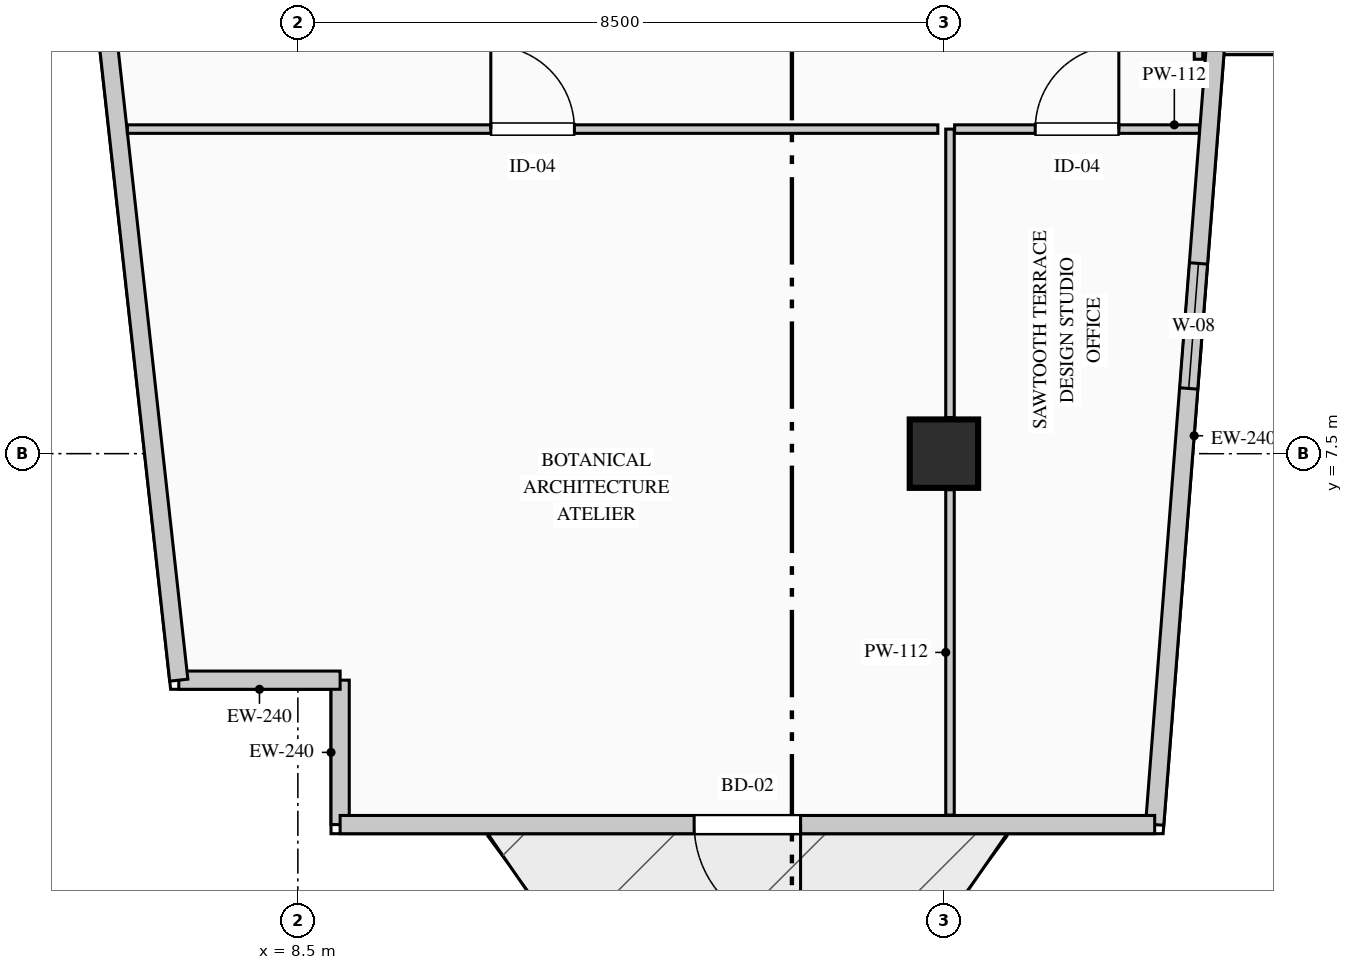
"""IFC4 building model, lengths in metres.
Left out: names, types, materials, properties, quantities, classifications, styles, units other than length and angle.
Written with IfcOpenShell. Run it as: python <this file> out.ifc"""

import sys

from ifc_helpers import new_model, si_unit, direction, frame, frame_2d, origin, origin_2d, place, context, subcontext, project, spatial, rectangle, extrude, element, fill, save


model = new_model("IFC4")
c1 = context("Model", 3, precision=1e-05, world=origin(), true_north=direction((0.0, 1.0)))
c2 = subcontext(c1, "Body", "Model", "MODEL_VIEW")
j1 = project(units=[si_unit("LENGTHUNIT", "METRE"), si_unit("PLANEANGLEUNIT", "RADIAN")], contexts=[c1])
p1 = place(None, origin())
s1 = spatial("IfcSite", under=j1, at=p1, CompositionType="ELEMENT")
p2 = place(p1, origin())
s2 = spatial("IfcBuilding", under=s1, at=p2, CompositionType="ELEMENT")
p3 = place(p2, frame((0.0, 0.0, 235.1)))
s3 = spatial("IfcBuildingStorey", under=s2, at=p3, CompositionType="ELEMENT", Elevation=235.1)
p4 = place(p3, frame((17.0, 7.5, 0.0), z_axis=(0.0, 0.0, 1.0), x_axis=(1.0, 0.0, 0.0)))
e1 = element("IfcColumn", 1, at=p4, inside=s3, PredefinedType="COLUMN", context=c2, shape_type="SweptSolid", body=[
    extrude(rectangle(XDim=0.9, YDim=0.9, at=origin_2d()), origin(), (0.0, 0.0, 1.0), 3.95),
])
p5 = place(p3, frame((9.056, 2.62, 0.0), z_axis=(0.0, 0.0, 1.0), x_axis=(0.0, 1.0, 0.0)))
e2 = element("IfcWall", 2, at=p5, inside=s3, PredefinedType="STANDARD", context=c2, shape_type="SweptSolid", body=[
    extrude(rectangle(XDim=1.9, YDim=0.24, at=frame_2d((0.95, 0.0))), origin(), (0.0, 0.0, 1.0), 3.7),
])
p6 = place(p3, frame((9.056, 4.52, 0.0), z_axis=(0.0, 0.0, 1.0), x_axis=(-1.0, 0.0, 0.0)))
e3 = element("IfcWall", 3, at=p6, inside=s3, PredefinedType="STANDARD", context=c2, shape_type="SweptSolid", body=[
    extrude(rectangle(XDim=2.123, YDim=0.24, at=frame_2d((1.061, 0.0))), origin(), (0.0, 0.0, 1.0), 3.7),
])
p7 = place(p3, frame((6.933, 4.52, 0.0), z_axis=(0.0, 0.0, 1.0), x_axis=(-0.109965284523, 0.993935428587, 0.0)))
e4 = element("IfcWall", 4, at=p7, inside=s3, PredefinedType="STANDARD", context=c2, shape_type="SweptSolid", body=[
    extrude(rectangle(XDim=37.186, YDim=0.24, at=frame_2d((18.593, 0.0))), origin(), (0.0, 0.0, 1.0), 3.7),
])
p8 = place(p7, frame((12.562, 0.0, 0.9)))
e5 = element("IfcOpeningElement", 5, at=p8, cuts=e4, PredefinedType="OPENING", context=c2, shape_type="SweptSolid", body=[
    extrude(rectangle(XDim=1.65, YDim=1.95, at=frame_2d((0.825, 0.975))), frame((0.0, 0.13, 0.0), z_axis=(0.0, -1.0, 0.0), x_axis=(1.0, 0.0, 0.0)), (0.0, 0.0, 1.0), 0.26),
])
p9 = place(p3, frame((26.495, 12.87, 0.0), z_axis=(0.0, 0.0, 1.0), x_axis=(-1.0, 0.0, 0.0)))
e6 = element("IfcWall", 6, at=p9, inside=s3, PredefinedType="STANDARD", context=c2, shape_type="SweptSolid", body=[
    extrude(rectangle(XDim=5.922, YDim=0.24, at=frame_2d((2.961, 0.0))), origin(), (0.0, 0.0, 1.0), 3.7),
])
p10 = place(p3, frame((20.573, 12.87, 0.0), z_axis=(0.0, 0.0, 1.0), x_axis=(-0.077816860153, -0.996967670627, 0.0)))
e7 = element("IfcWall", 7, at=p10, inside=s3, PredefinedType="STANDARD", context=c2, shape_type="SweptSolid", body=[
    extrude(rectangle(XDim=10.281, YDim=0.24, at=frame_2d((5.141, 0.0))), origin(), (0.0, 0.0, 1.0), 3.7),
])
p11 = place(p10, frame((2.876, 0.0, 0.9)))
e8 = element("IfcOpeningElement", 8, at=p11, cuts=e7, PredefinedType="OPENING", context=c2, shape_type="SweptSolid", body=[
    extrude(rectangle(XDim=1.65, YDim=1.95, at=frame_2d((0.825, 0.975))), frame((0.0, 0.13, 0.0), z_axis=(0.0, -1.0, 0.0), x_axis=(1.0, 0.0, 0.0)), (0.0, 0.0, 1.0), 0.26),
])
p12 = place(p3, frame((19.773, 2.62, 0.0), z_axis=(0.0, 0.0, 1.0), x_axis=(-1.0, 0.0, 0.0)))
e9 = element("IfcWall", 9, at=p12, inside=s3, PredefinedType="STANDARD", context=c2, shape_type="SweptSolid", body=[
    extrude(rectangle(XDim=10.717, YDim=0.24, at=frame_2d((5.358, 0.0))), origin(), (0.0, 0.0, 1.0), 3.7),
])
p13 = place(p12, frame((4.659, 0.0, 0.0)))
e10 = element("IfcOpeningElement", 10, at=p13, cuts=e9, PredefinedType="OPENING", context=c2, shape_type="SweptSolid", body=[
    extrude(rectangle(XDim=1.4, YDim=2.2, at=frame_2d((0.7, 1.1))), frame((0.0, 0.13, 0.0), z_axis=(0.0, -1.0, 0.0), x_axis=(1.0, 0.0, 0.0)), (0.0, 0.0, 1.0), 0.26),
])
p14 = place(p3, frame((17.08, 2.745, 0.0), z_axis=(0.0, 0.0, 1.0), x_axis=(0.0, 1.0, 0.0)))
e11 = element("IfcWall", 11, at=p14, inside=s3, PredefinedType="PARTITIONING", context=c2, shape_type="SweptSolid", body=[
    extrude(rectangle(XDim=4.28, YDim=0.112, at=frame_2d((2.14, 0.0))), origin(), (0.0, 0.0, 1.0), 3.7),
])
p15 = place(p3, frame((17.08, 7.975, 0.0), z_axis=(0.0, 0.0, 1.0), x_axis=(0.0, 1.0, 0.0)))
e12 = element("IfcWall", 12, at=p15, inside=s3, PredefinedType="PARTITIONING", context=c2, shape_type="SweptSolid", body=[
    extrude(rectangle(XDim=3.795, YDim=0.112, at=frame_2d((1.897, 0.0))), origin(), (0.0, 0.0, 1.0), 3.185),
])
p16 = place(p3, frame((17.141, 11.77, 0.0), z_axis=(0.0, 0.0, 1.0), x_axis=(1.0, 0.0, 0.0)))
e13 = element("IfcWall", 13, at=p16, inside=s3, PredefinedType="PARTITIONING", context=c2, shape_type="SweptSolid", body=[
    extrude(rectangle(XDim=3.221, YDim=0.112, at=frame_2d((1.61, 0.0))), origin(), (0.0, 0.0, 1.0), 3.7),
])
p17 = place(p16, frame((1.06, 0.0, 0.0)))
e14 = element("IfcOpeningElement", 14, at=p17, cuts=e13, PredefinedType="OPENING", context=c2, shape_type="SweptSolid", body=[
    extrude(rectangle(XDim=1.1, YDim=2.2, at=frame_2d((0.55, 1.1))), frame((0.0, 0.066, 0.0), z_axis=(0.0, -1.0, 0.0), x_axis=(1.0, 0.0, 0.0)), (0.0, 0.0, 1.0), 0.132),
])
p18 = place(p3, frame((6.257, 11.77, 0.0), z_axis=(0.0, 0.0, 1.0), x_axis=(1.0, 0.0, 0.0)))
e15 = element("IfcWall", 15, at=p18, inside=s3, PredefinedType="PARTITIONING", context=c2, shape_type="SweptSolid", body=[
    extrude(rectangle(XDim=10.663, YDim=0.112, at=frame_2d((5.332, 0.0))), origin(), (0.0, 0.0, 1.0), 3.7),
])
p19 = place(p18, frame((4.781, 0.0, 0.0)))
e16 = element("IfcOpeningElement", 16, at=p19, cuts=e15, PredefinedType="OPENING", context=c2, shape_type="SweptSolid", body=[
    extrude(rectangle(XDim=1.1, YDim=2.2, at=frame_2d((0.55, 1.1))), frame((0.0, 0.066, 0.0), z_axis=(0.0, -1.0, 0.0), x_axis=(1.0, 0.0, 0.0)), (0.0, 0.0, 1.0), 0.132),
])
p20 = place(p3, frame((20.35, 12.689, 0.0), z_axis=(0.0, 0.0, 1.0), x_axis=(0.0, 1.0, 0.0)))
e17 = element("IfcWall", 17, at=p20, inside=s3, PredefinedType="PARTITIONING", context=c2, shape_type="SweptSolid", body=[
    extrude(rectangle(XDim=6.121, YDim=0.112, at=frame_2d((3.061, 0.0))), origin(), (0.0, 0.0, 1.0), 3.7),
])
p21 = place(p20, frame((2.511, 0.0, 0.0)))
e18 = element("IfcOpeningElement", 18, at=p21, cuts=e17, PredefinedType="OPENING", context=c2, shape_type="SweptSolid", body=[
    extrude(rectangle(XDim=1.1, YDim=2.2, at=frame_2d((0.55, 1.1))), frame((0.0, 0.066, 0.0), z_axis=(0.0, -1.0, 0.0), x_axis=(1.0, 0.0, 0.0)), (0.0, 0.0, 1.0), 0.132),
])
p22 = place(p11, origin())
e19 = element("IfcWindow", 19, at=p22, inside=s3, PartitioningType="SINGLE_PANEL", PredefinedType="WINDOW", context=c2, shape_type="SweptSolid", body=[
    extrude(rectangle(XDim=1.65, YDim=1.95, at=frame_2d((0.825, 0.975))), frame((0.0, 0.03, 0.0), z_axis=(0.0, -1.0, 0.0), x_axis=(1.0, 0.0, 0.0)), (0.0, 0.0, 1.0), 0.06),
])
fill(e8, e19)
p23 = place(p13, origin())
e20 = element("IfcDoor", 20, at=p23, inside=s3, OperationType="SINGLE_SWING_LEFT", PredefinedType="DOOR", context=c2, shape_type="SweptSolid", body=[
    extrude(rectangle(XDim=1.4, YDim=2.2, at=frame_2d((0.7, 1.1))), frame((0.0, 0.025, 0.0), z_axis=(0.0, -1.0, 0.0), x_axis=(1.0, 0.0, 0.0)), (0.0, 0.0, 1.0), 0.05),
])
fill(e10, e20)
p24 = place(p17, origin())
e21 = element("IfcDoor", 21, at=p24, inside=s3, OperationType="SINGLE_SWING_RIGHT", PredefinedType="DOOR", context=c2, shape_type="SweptSolid", body=[
    extrude(rectangle(XDim=1.1, YDim=2.2, at=frame_2d((0.55, 1.1))), frame((0.0, 0.025, 0.0), z_axis=(0.0, -1.0, 0.0), x_axis=(1.0, 0.0, 0.0)), (0.0, 0.0, 1.0), 0.05),
])
fill(e14, e21)
p25 = place(p19, origin())
e22 = element("IfcDoor", 22, at=p25, inside=s3, OperationType="SINGLE_SWING_LEFT", PredefinedType="DOOR", context=c2, shape_type="SweptSolid", body=[
    extrude(rectangle(XDim=1.1, YDim=2.2, at=frame_2d((0.55, 1.1))), frame((0.0, 0.025, 0.0), z_axis=(0.0, -1.0, 0.0), x_axis=(1.0, 0.0, 0.0)), (0.0, 0.0, 1.0), 0.05),
])
fill(e16, e22)
save(model, sys.argv[1])
